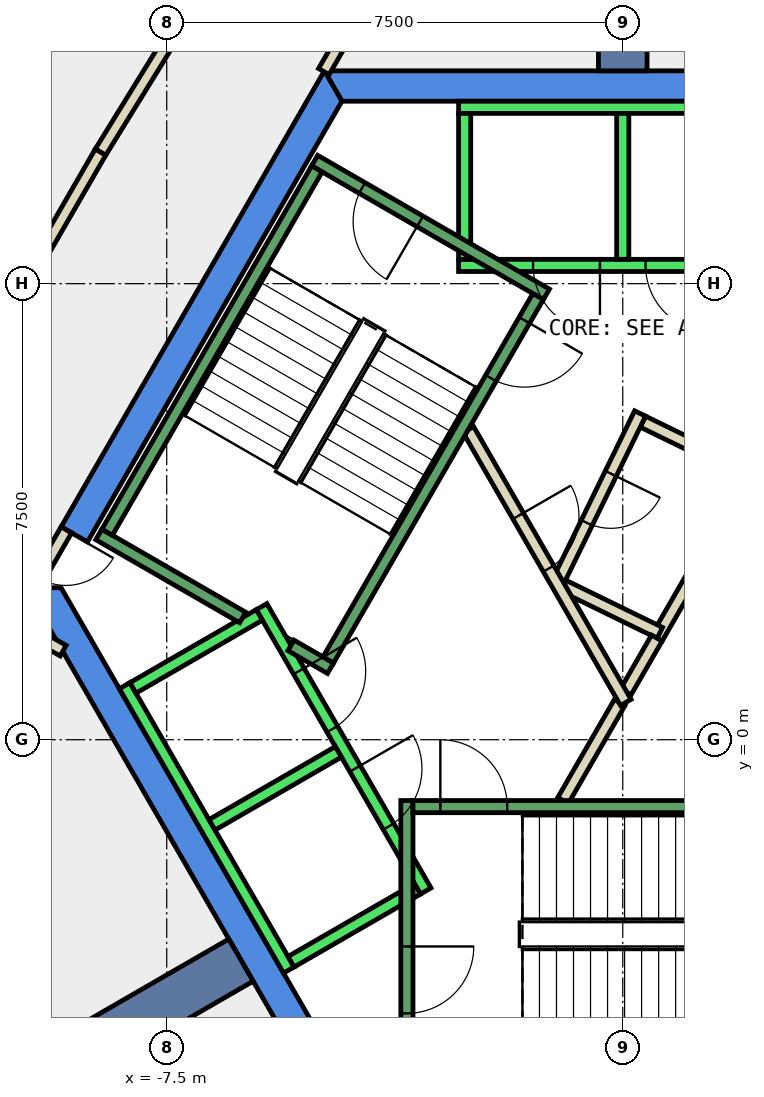
"""IFC4 building model, lengths in metres.
Left out: names, types, materials, properties, quantities, classifications, styles, units other than length and angle.
Written with IfcOpenShell. Run it as: python <this file> out.ifc"""

import sys

from ifc_helpers import new_model, si_unit, direction, frame, frame_2d, origin, place, context, subcontext, project, spatial, polyline, rectangle, outline, extrude, element, fill, save


model = new_model("IFC4")
c1 = context("Model", 3, precision=1e-05, world=origin(), true_north=direction((0.0, 1.0)))
c2 = subcontext(c1, "Body", "Model", "MODEL_VIEW")
j1 = project(units=[si_unit("LENGTHUNIT", "METRE"), si_unit("PLANEANGLEUNIT", "RADIAN")], contexts=[c1])
p1 = place(None, origin())
s1 = spatial("IfcSite", under=j1, at=p1, CompositionType="ELEMENT")
p2 = place(p1, origin())
s2 = spatial("IfcBuilding", under=s1, at=p2, CompositionType="ELEMENT")
p3 = place(p2, frame((0.0, 0.0, 311.6)))
s3 = spatial("IfcBuildingStorey", under=s2, at=p3, CompositionType="ELEMENT", Elevation=311.6)
p4 = place(p3, frame((0.0, 0.0, -0.34)))
e1 = element("IfcWall", 1, at=p4, inside=s3, PredefinedType="SHEAR", context=c2, shape_type="SweptSolid", body=[
    extrude(outline(polyline([(4.907, 11.0), (-4.907, 11.0), (-4.619, 10.5), (4.619, 10.5), (4.907, 11.0)])), origin(), (0.0, 0.0, 1.0), 3.6),
])
p5 = place(p3, frame((0.0, 0.0, -0.34)))
e2 = element("IfcWall", 2, at=p5, inside=s3, PredefinedType="SHEAR", context=c2, shape_type="SweptSolid", body=[
    extrude(outline(polyline([(-9.236, 3.502), (-8.803, 3.253), (-4.619, 10.5), (-4.907, 11.0), (-9.236, 3.502)])), origin(), (0.0, 0.0, 1.0), 3.6),
])
p6 = place(p3, frame((0.0, 0.0, -0.34)))
e3 = element("IfcWall", 3, at=p6, inside=s3, PredefinedType="SHEAR", context=c2, shape_type="SweptSolid", body=[
    extrude(outline(polyline([(-9.815, 2.5), (-4.907, -6.0), (-4.619, -5.5), (-9.238, 2.5), (-9.815, 2.5)])), origin(), (0.0, 0.0, 1.0), 3.6),
])
p7 = place(p3, frame((0.0, 11.0, -0.34), z_axis=(0.0, 0.0, 1.0), x_axis=(0.0, 1.0, 0.0)))
e4 = element("IfcWall", 4, at=p7, inside=s3, PredefinedType="SHEAR", context=c2, shape_type="SweptSolid", body=[
    extrude(rectangle(XDim=9.0, YDim=0.8, at=frame_2d((4.5, 0.0))), origin(), (0.0, 0.0, 1.0), 3.6),
])
p8 = place(p3, frame((-6.279, -3.625, -0.34), z_axis=(0.0, 0.0, 1.0), x_axis=(-0.866017533419, -0.500013631625, 0.0)))
e5 = element("IfcWall", 5, at=p8, inside=s3, PredefinedType="SHEAR", context=c2, shape_type="SweptSolid", body=[
    extrude(rectangle(XDim=9.0, YDim=0.8, at=frame_2d((4.5, 0.0))), origin(), (0.0, 0.0, 1.0), 3.6),
])
p9 = place(p3, frame((0.56, 1.671, 0.0), z_axis=(0.0, 0.0, 1.0), x_axis=(0.500008334558, 0.866020591771, 0.0)))
e6 = element("IfcWall", 6, at=p9, inside=s3, PredefinedType="PARTITIONING", context=c2, shape_type="SweptSolid", body=[
    extrude(rectangle(XDim=2.538, YDim=0.2, at=frame_2d((1.269, 0.0))), origin(), (0.0, 0.0, 1.0), 3.26),
])
p10 = place(p3, frame((2.128, 4.355, 0.0), z_axis=(0.0, 0.0, 1.0), x_axis=(-0.898876404494, 0.438202247191, 0.0)))
e7 = element("IfcWall", 7, at=p10, inside=s3, PredefinedType="PARTITIONING", context=c2, shape_type="SweptSolid", body=[
    extrude(rectangle(XDim=1.999, YDim=0.2, at=frame_2d((1.0, 0.0))), origin(), (0.0, 0.0, 1.0), 3.26),
])
p11 = place(p3, frame((0.285, 5.365, 0.0), z_axis=(0.0, 0.0, 1.0), x_axis=(-0.43840190643, -0.898779043168, 0.0)))
e8 = element("IfcWall", 8, at=p11, inside=s3, PredefinedType="PARTITIONING", context=c2, shape_type="SweptSolid", body=[
    extrude(rectangle(XDim=3.1, YDim=0.2, at=frame_2d((1.55, 0.0))), origin(), (0.0, 0.0, 1.0), 3.26),
])
p12 = place(p11, frame((1.1, 0.0, 0.0)))
e9 = element("IfcOpeningElement", 9, at=p12, cuts=e8, PredefinedType="OPENING", context=c2, shape_type="SweptSolid", body=[
    extrude(rectangle(XDim=0.9, YDim=2.1, at=frame_2d((0.45, 1.05))), frame((0.0, 0.11, 0.0), z_axis=(0.0, -1.0, 0.0), x_axis=(1.0, 0.0, 0.0)), (0.0, 0.0, 1.0), 0.22),
])
p13 = place(p3, frame((-0.984, 2.535, 0.0), z_axis=(0.0, 0.0, 1.0), x_axis=(0.898707583217, -0.438548378025, 0.0)))
e10 = element("IfcWall", 10, at=p13, inside=s3, PredefinedType="PARTITIONING", context=c2, shape_type="SweptSolid", body=[
    extrude(rectangle(XDim=1.774, YDim=0.2, at=frame_2d((0.887, 0.0))), origin(), (0.0, 0.0, 1.0), 3.26),
])
p14 = place(p3, frame((-4.513, 11.687, 0.0), z_axis=(0.0, 0.0, 1.0), x_axis=(-0.499556546863, -0.866281280235, 0.0)))
e11 = element("IfcWall", 11, at=p14, inside=s3, PredefinedType="PARTITIONING", context=c2, shape_type="SweptSolid", body=[
    extrude(rectangle(XDim=0.807, YDim=0.2, at=frame_2d((0.403, 0.0))), origin(), (0.0, 0.0, 1.0), 3.26),
])
p15 = place(p3, frame((-9.203, 1.465, 0.0), z_axis=(0.0, 0.0, 1.0), x_axis=(-0.872341127106, 0.488897696823, 0.0)))
e12 = element("IfcWall", 12, at=p15, inside=s3, PredefinedType="PARTITIONING", context=c2, shape_type="SweptSolid", body=[
    extrude(rectangle(XDim=1.667, YDim=0.2, at=frame_2d((0.833, 0.0))), origin(), (0.0, 0.0, 1.0), 3.26),
])
p16 = place(p3, frame((-12.701, 2.54, 0.0), z_axis=(0.0, 0.0, 1.0), x_axis=(0.499946799636, 0.86605611685, 0.0)))
e13 = element("IfcWall", 13, at=p16, inside=s3, PredefinedType="PARTITIONING", context=c2, shape_type="SweptSolid", body=[
    extrude(rectangle(XDim=8.227, YDim=0.2, at=frame_2d((4.114, 0.0))), origin(), (0.0, 0.0, 1.0), 3.26),
])
p17 = place(p16, frame((3.613, 0.0, 0.0)))
e14 = element("IfcOpeningElement", 14, at=p17, cuts=e13, PredefinedType="OPENING", context=c2, shape_type="SweptSolid", body=[
    extrude(rectangle(XDim=1.0, YDim=2.1, at=frame_2d((0.5, 1.05))), frame((0.0, 0.11, 0.0), z_axis=(0.0, -1.0, 0.0), x_axis=(1.0, 0.0, 0.0)), (0.0, 0.0, 1.0), 0.22),
])
p18 = place(p3, frame((-8.588, 9.665, 0.0), z_axis=(0.0, 0.0, 1.0), x_axis=(0.525142215688, 0.851014484778, 0.0)))
e15 = element("IfcWall", 15, at=p18, inside=s3, PredefinedType="PARTITIONING", context=c2, shape_type="SweptSolid", body=[
    extrude(rectangle(XDim=7.872, YDim=0.2, at=frame_2d((3.936, 0.0))), origin(), (0.0, 0.0, 1.0), 3.26),
])
p19 = place(p3, frame((-0.982, -1.0, 0.0), z_axis=(0.0, 0.0, 1.0), x_axis=(0.50024047865, 0.865886518847, 0.0)))
e16 = element("IfcWall", 16, at=p19, inside=s3, PredefinedType="PARTITIONING", context=c2, shape_type="SweptSolid", body=[
    extrude(rectangle(XDim=1.863, YDim=0.2, at=frame_2d((0.931, 0.0))), origin(), (0.0, 0.0, 1.0), 3.26),
])
p20 = place(p3, frame((0.05, 0.787, 0.0), z_axis=(0.0, 0.0, 1.0), x_axis=(0.499819111317, 0.866129814729, 0.0)))
e17 = element("IfcWall", 17, at=p20, inside=s3, PredefinedType="PARTITIONING", context=c2, shape_type="SweptSolid", body=[
    extrude(rectangle(XDim=1.021, YDim=0.2, at=frame_2d((0.51, 0.0))), origin(), (0.0, 0.0, 1.0), 3.26),
])
p21 = place(p3, frame((-2.54, 5.1, 0.0), z_axis=(0.0, 0.0, 1.0), x_axis=(0.499925051871, -0.866068670783, 0.0)))
e18 = element("IfcWall", 18, at=p21, inside=s3, PredefinedType="PARTITIONING", context=c2, shape_type="SweptSolid", body=[
    extrude(rectangle(XDim=5.181, YDim=0.2, at=frame_2d((2.59, 0.0))), origin(), (0.0, 0.0, 1.0), 3.26),
])
p22 = place(p21, frame((1.64, 0.0, 0.0)))
e19 = element("IfcOpeningElement", 19, at=p22, cuts=e18, PredefinedType="OPENING", context=c2, shape_type="SweptSolid", body=[
    extrude(rectangle(XDim=1.0, YDim=2.1, at=frame_2d((0.5, 1.05))), frame((0.0, 0.11, 0.0), z_axis=(0.0, -1.0, 0.0), x_axis=(1.0, 0.0, 0.0)), (0.0, 0.0, 1.0), 0.22),
])
p23 = place(p3, frame((-9.15, 3.452, 0.0), z_axis=(0.0, 0.0, 1.0), x_axis=(-0.500079945886, -0.865979242085, 0.0)))
e20 = element("IfcWall", 20, at=p23, inside=s3, PredefinedType="PARTITIONING", context=c2, shape_type="SweptSolid", body=[
    extrude(rectangle(XDim=0.926, YDim=0.2, at=frame_2d((0.463, 0.0))), origin(), (0.0, 0.0, 1.0), 2.4),
])
p24 = place(p23, frame((0.017, 0.0, 0.0)))
e21 = element("IfcOpeningElement", 21, at=p24, cuts=e20, PredefinedType="OPENING", context=c2, shape_type="SweptSolid", body=[
    extrude(rectangle(XDim=0.9, YDim=2.1, at=frame_2d((0.45, 1.05))), frame((0.0, 0.11, 0.0), z_axis=(0.0, -1.0, 0.0), x_axis=(1.0, 0.0, 0.0)), (0.0, 0.0, 1.0), 0.22),
])
p25 = place(p3, frame((2.7, 7.8, 0.0), z_axis=(0.0, 0.0, 1.0), x_axis=(-1.0, 0.0, 0.0)))
e22 = element("IfcWall", 22, at=p25, inside=s3, PredefinedType="STANDARD", context=c2, shape_type="SweptSolid", body=[
    extrude(rectangle(XDim=5.4, YDim=0.2, at=frame_2d((2.7, 0.0))), origin(), (0.0, 0.0, 1.0), 3.26),
])
p26 = place(p25, frame((1.225, 0.0, 0.0)))
e23 = element("IfcOpeningElement", 23, at=p26, cuts=e22, PredefinedType="OPENING", context=c2, shape_type="SweptSolid", body=[
    extrude(rectangle(XDim=1.1, YDim=2.1, at=frame_2d((0.55, 1.05))), frame((0.0, 0.11, 0.0), z_axis=(0.0, -1.0, 0.0), x_axis=(1.0, 0.0, 0.0)), (0.0, 0.0, 1.0), 0.22),
])
p27 = place(p25, frame((3.075, 0.0, 0.0)))
e24 = element("IfcOpeningElement", 24, at=p27, cuts=e22, PredefinedType="OPENING", context=c2, shape_type="SweptSolid", body=[
    extrude(rectangle(XDim=1.1, YDim=2.1, at=frame_2d((0.55, 1.05))), frame((0.0, 0.11, 0.0), z_axis=(0.0, -1.0, 0.0), x_axis=(1.0, 0.0, 0.0)), (0.0, 0.0, 1.0), 0.22),
])
p28 = place(p3, frame((2.7, 10.4, 0.0), z_axis=(0.0, 0.0, 1.0), x_axis=(-1.0, 0.0, 0.0)))
e25 = element("IfcWall", 25, at=p28, inside=s3, PredefinedType="STANDARD", context=c2, shape_type="SweptSolid", body=[
    extrude(rectangle(XDim=5.4, YDim=0.2, at=frame_2d((2.7, 0.0))), origin(), (0.0, 0.0, 1.0), 3.26),
])
for number, where, z_axis, x_axis in (
    (26, (0.0, 7.9, 0.0), (0.0, 0.0, 1.0), (0.0, 1.0, 0.0)),
    (27, (-2.6, 7.9, 0.0), (0.0, 0.0, 1.0), (0.0, 1.0, 0.0)),
):
    element("IfcWall", number, at=place(p3, frame(where, z_axis=z_axis, x_axis=x_axis)), inside=s3, PredefinedType="STANDARD", context=c2, shape_type="SweptSolid", body=[
        extrude(rectangle(XDim=2.4, YDim=0.2, at=frame_2d((1.2, 0.0))), origin(), (0.0, 0.0, 1.0), 3.26),
    ])
p29 = place(p3, frame((-5.94, 2.188, 0.0), z_axis=(0.0, 0.0, 1.0), x_axis=(0.500034260056, -0.866005622828, 0.0)))
e28 = element("IfcWall", 28, at=p29, inside=s3, PredefinedType="STANDARD", context=c2, shape_type="SweptSolid", body=[
    extrude(rectangle(XDim=5.399, YDim=0.2, at=frame_2d((2.7, 0.0))), origin(), (0.0, 0.0, 1.0), 3.26),
])
p30 = place(p29, frame((3.075, 0.0, 0.0)))
e29 = element("IfcOpeningElement", 29, at=p30, cuts=e28, PredefinedType="OPENING", context=c2, shape_type="SweptSolid", body=[
    extrude(rectangle(XDim=1.1, YDim=2.1, at=frame_2d((0.55, 1.05))), frame((0.0, 0.11, 0.0), z_axis=(0.0, -1.0, 0.0), x_axis=(1.0, 0.0, 0.0)), (0.0, 0.0, 1.0), 0.22),
])
p31 = place(p29, frame((1.225, 0.0, 0.0)))
e30 = element("IfcOpeningElement", 30, at=p31, cuts=e28, PredefinedType="OPENING", context=c2, shape_type="SweptSolid", body=[
    extrude(rectangle(XDim=1.1, YDim=2.1, at=frame_2d((0.55, 1.05))), frame((0.0, 0.11, 0.0), z_axis=(0.0, -1.0, 0.0), x_axis=(1.0, 0.0, 0.0)), (0.0, 0.0, 1.0), 0.22),
])
p32 = place(p3, frame((-8.192, 0.888, 0.0), z_axis=(0.0, 0.0, 1.0), x_axis=(0.500034260056, -0.866005622828, 0.0)))
e31 = element("IfcWall", 31, at=p32, inside=s3, PredefinedType="STANDARD", context=c2, shape_type="SweptSolid", body=[
    extrude(rectangle(XDim=5.399, YDim=0.2, at=frame_2d((2.7, 0.0))), origin(), (0.0, 0.0, 1.0), 3.26),
])
for number, where, z_axis, x_axis in (
    (32, (-5.977, 2.052, 0.0), (0.0, 0.0, 1.0), (-0.866, -0.5, 0.0)),
    (33, (-4.677, -0.2, 0.0), (0.0, 0.0, 1.0), (-0.866, -0.5, 0.0)),
):
    element("IfcWall", number, at=place(p3, frame(where, z_axis=z_axis, x_axis=x_axis)), inside=s3, PredefinedType="STANDARD", context=c2, shape_type="SweptSolid", body=[
        extrude(rectangle(XDim=2.399, YDim=0.2, at=frame_2d((1.2, 0.0))), origin(), (0.0, 0.0, 1.0), 3.26),
    ])
p33 = place(p3, frame((-3.377, -2.452, 0.0), z_axis=(0.0, 0.0, 1.0), x_axis=(-0.865955154139, -0.50012165622, 0.0)))
e34 = element("IfcWall", 34, at=p33, inside=s3, PredefinedType="STANDARD", context=c2, shape_type="SweptSolid", body=[
    extrude(rectangle(XDim=2.4, YDim=0.2, at=frame_2d((1.2, 0.0))), origin(), (0.0, 0.0, 1.0), 3.26),
])
p34 = place(p3, frame((-3.55, -1.0, 0.0), z_axis=(0.0, 0.0, 1.0), x_axis=(0.0, -1.0, 0.0)))
e35 = element("IfcWall", 35, at=p34, inside=s3, PredefinedType="STANDARD", context=c2, shape_type="SweptSolid", body=[
    extrude(rectangle(XDim=4.4, YDim=0.2, at=frame_2d((2.2, 0.0))), origin(), (0.0, 0.0, 1.0), 3.26),
])
p35 = place(p34, frame((2.4, 0.0, 0.0)))
e36 = element("IfcOpeningElement", 36, at=p35, cuts=e35, PredefinedType="OPENING", context=c2, shape_type="SweptSolid", body=[
    extrude(rectangle(XDim=1.1, YDim=2.2, at=frame_2d((0.55, 1.1))), frame((0.0, 0.11, 0.0), z_axis=(0.0, -1.0, 0.0), x_axis=(1.0, 0.0, 0.0)), (0.0, 0.0, 1.0), 0.22),
])
p36 = place(p3, frame((-3.45, -1.1, 0.0), z_axis=(0.0, 0.0, 1.0), x_axis=(1.0, 0.0, 0.0)))
e37 = element("IfcWall", 37, at=p36, inside=s3, PredefinedType="STANDARD", context=c2, shape_type="SweptSolid", body=[
    extrude(rectangle(XDim=6.9, YDim=0.2, at=frame_2d((3.45, 0.0))), origin(), (0.0, 0.0, 1.0), 3.26),
])
p37 = place(p36, frame((0.45, 0.0, 0.0)))
e38 = element("IfcOpeningElement", 38, at=p37, cuts=e37, PredefinedType="OPENING", context=c2, shape_type="SweptSolid", body=[
    extrude(rectangle(XDim=1.1, YDim=2.2, at=frame_2d((0.55, 1.1))), frame((0.0, 0.11, 0.0), z_axis=(0.0, -1.0, 0.0), x_axis=(1.0, 0.0, 0.0)), (0.0, 0.0, 1.0), 0.22),
])
p38 = place(p3, frame((-1.256, 7.324, 0.0), z_axis=(0.0, 0.0, 1.0), x_axis=(-0.866046073146, 0.499964197906, 0.0)))
e39 = element("IfcWall", 39, at=p38, inside=s3, PredefinedType="STANDARD", context=c2, shape_type="SweptSolid", body=[
    extrude(rectangle(XDim=4.4, YDim=0.2, at=frame_2d((2.2, 0.0))), origin(), (0.0, 0.0, 1.0), 3.26),
])
p39 = place(p38, frame((2.4, 0.0, 0.0)))
e40 = element("IfcOpeningElement", 40, at=p39, cuts=e39, PredefinedType="OPENING", context=c2, shape_type="SweptSolid", body=[
    extrude(rectangle(XDim=1.1, YDim=2.2, at=frame_2d((0.55, 1.1))), frame((0.0, 0.11, 0.0), z_axis=(0.0, -1.0, 0.0), x_axis=(1.0, 0.0, 0.0)), (0.0, 0.0, 1.0), 0.22),
])
p40 = place(p3, frame((-6.25, 2.01, 0.0), z_axis=(0.0, 0.0, 1.0), x_axis=(-0.86611865017, 0.499838457731, 0.0)))
e41 = element("IfcWall", 41, at=p40, inside=s3, PredefinedType="STANDARD", context=c2, shape_type="SweptSolid", body=[
    extrude(rectangle(XDim=2.733, YDim=0.2, at=frame_2d((1.366, 0.0))), origin(), (0.0, 0.0, 1.0), 3.26),
])
p41 = place(p3, frame((-4.806, 1.176, 0.0), z_axis=(0.0, 0.0, 1.0), x_axis=(-0.866558586415, 0.499075361355, 0.0)))
e42 = element("IfcWall", 42, at=p41, inside=s3, PredefinedType="STANDARD", context=c2, shape_type="SweptSolid", body=[
    extrude(rectangle(XDim=0.751, YDim=0.2, at=frame_2d((0.376, 0.0))), origin(), (0.0, 0.0, 1.0), 3.26),
])
p42 = place(p3, frame((-1.393, 7.288, 0.0), z_axis=(0.0, 0.0, 1.0), x_axis=(-0.499963383562, -0.866046543262, 0.0)))
e43 = element("IfcWall", 43, at=p42, inside=s3, PredefinedType="STANDARD", context=c2, shape_type="SweptSolid", body=[
    extrude(rectangle(XDim=6.9, YDim=0.2, at=frame_2d((3.45, 0.0))), origin(), (0.0, 0.0, 1.0), 3.26),
])
p43 = place(p42, frame((0.45, 0.0, 0.0)))
e44 = element("IfcOpeningElement", 44, at=p43, cuts=e43, PredefinedType="OPENING", context=c2, shape_type="SweptSolid", body=[
    extrude(rectangle(XDim=1.1, YDim=2.2, at=frame_2d((0.55, 1.1))), frame((0.0, 0.11, 0.0), z_axis=(0.0, -1.0, 0.0), x_axis=(1.0, 0.0, 0.0)), (0.0, 0.0, 1.0), 0.22),
])
p44 = place(p3, frame((-5.03, 9.388, 0.0), z_axis=(0.0, 0.0, 1.0), x_axis=(-0.499978703459, -0.866037698999, 0.0)))
e45 = element("IfcWall", 45, at=p44, inside=s3, PredefinedType="STANDARD", context=c2, shape_type="SweptSolid", body=[
    extrude(rectangle(XDim=6.9, YDim=0.2, at=frame_2d((3.45, 0.0))), origin(), (0.0, 0.0, 1.0), 3.26),
])
p45 = place(p22, origin())
e46 = element("IfcDoor", 46, at=p45, inside=s3, OperationType="SINGLE_SWING_RIGHT", PredefinedType="DOOR", context=c2, shape_type="SweptSolid", body=[
    extrude(rectangle(XDim=1.0, YDim=2.1, at=frame_2d((0.5, 1.05))), frame((0.0, 0.025, 0.0), z_axis=(0.0, -1.0, 0.0), x_axis=(1.0, 0.0, 0.0)), (0.0, 0.0, 1.0), 0.05),
])
fill(e19, e46)
p46 = place(p12, origin())
e47 = element("IfcDoor", 47, at=p46, inside=s3, OperationType="SINGLE_SWING_RIGHT", PredefinedType="DOOR", context=c2, shape_type="SweptSolid", body=[
    extrude(rectangle(XDim=0.9, YDim=2.1, at=frame_2d((0.45, 1.05))), frame((0.0, 0.025, 0.0), z_axis=(0.0, -1.0, 0.0), x_axis=(1.0, 0.0, 0.0)), (0.0, 0.0, 1.0), 0.05),
])
fill(e9, e47)
p47 = place(p24, origin())
e48 = element("IfcDoor", 48, at=p47, inside=s3, OperationType="SINGLE_SWING_LEFT", PredefinedType="DOOR", context=c2, shape_type="SweptSolid", body=[
    extrude(rectangle(XDim=0.9, YDim=2.1, at=frame_2d((0.45, 1.05))), frame((0.0, 0.025, 0.0), z_axis=(0.0, -1.0, 0.0), x_axis=(1.0, 0.0, 0.0)), (0.0, 0.0, 1.0), 0.05),
])
fill(e21, e48)
p48 = place(p26, origin())
e49 = element("IfcDoor", 49, at=p48, inside=s3, OperationType="SLIDING_TO_LEFT", PredefinedType="DOOR", context=c2, shape_type="SweptSolid", body=[
    extrude(rectangle(XDim=1.1, YDim=2.1, at=frame_2d((0.55, 1.05))), frame((0.0, 0.025, 0.0), z_axis=(0.0, -1.0, 0.0), x_axis=(1.0, 0.0, 0.0)), (0.0, 0.0, 1.0), 0.05),
])
fill(e23, e49)
p49 = place(p27, origin())
e50 = element("IfcDoor", 50, at=p49, inside=s3, OperationType="SLIDING_TO_LEFT", PredefinedType="DOOR", context=c2, shape_type="SweptSolid", body=[
    extrude(rectangle(XDim=1.1, YDim=2.1, at=frame_2d((0.55, 1.05))), frame((0.0, 0.025, 0.0), z_axis=(0.0, -1.0, 0.0), x_axis=(1.0, 0.0, 0.0)), (0.0, 0.0, 1.0), 0.05),
])
fill(e24, e50)
p50 = place(p30, origin())
e51 = element("IfcDoor", 51, at=p50, inside=s3, OperationType="SLIDING_TO_LEFT", PredefinedType="DOOR", context=c2, shape_type="SweptSolid", body=[
    extrude(rectangle(XDim=1.1, YDim=2.1, at=frame_2d((0.55, 1.05))), frame((0.0, 0.025, 0.0), z_axis=(0.0, -1.0, 0.0), x_axis=(1.0, 0.0, 0.0)), (0.0, 0.0, 1.0), 0.05),
])
fill(e29, e51)
p51 = place(p31, origin())
e52 = element("IfcDoor", 52, at=p51, inside=s3, OperationType="SLIDING_TO_LEFT", PredefinedType="DOOR", context=c2, shape_type="SweptSolid", body=[
    extrude(rectangle(XDim=1.1, YDim=2.1, at=frame_2d((0.55, 1.05))), frame((0.0, 0.025, 0.0), z_axis=(0.0, -1.0, 0.0), x_axis=(1.0, 0.0, 0.0)), (0.0, 0.0, 1.0), 0.05),
])
fill(e30, e52)
p52 = place(p37, origin())
e53 = element("IfcDoor", 53, at=p52, inside=s3, OperationType="SINGLE_SWING_LEFT", PredefinedType="DOOR", context=c2, shape_type="SweptSolid", body=[
    extrude(rectangle(XDim=1.1, YDim=2.2, at=frame_2d((0.55, 1.1))), frame((0.0, 0.025, 0.0), z_axis=(0.0, -1.0, 0.0), x_axis=(1.0, 0.0, 0.0)), (0.0, 0.0, 1.0), 0.05),
])
fill(e38, e53)
p53 = place(p35, origin())
e54 = element("IfcDoor", 54, at=p53, inside=s3, OperationType="SINGLE_SWING_LEFT", PredefinedType="DOOR", context=c2, shape_type="SweptSolid", body=[
    extrude(rectangle(XDim=1.1, YDim=2.2, at=frame_2d((0.55, 1.1))), frame((0.0, 0.025, 0.0), z_axis=(0.0, -1.0, 0.0), x_axis=(1.0, 0.0, 0.0)), (0.0, 0.0, 1.0), 0.05),
])
fill(e36, e54)
p54 = place(p43, origin())
e55 = element("IfcDoor", 55, at=p54, inside=s3, OperationType="SINGLE_SWING_LEFT", PredefinedType="DOOR", context=c2, shape_type="SweptSolid", body=[
    extrude(rectangle(XDim=1.1, YDim=2.2, at=frame_2d((0.55, 1.1))), frame((0.0, 0.025, 0.0), z_axis=(0.0, -1.0, 0.0), x_axis=(1.0, 0.0, 0.0)), (0.0, 0.0, 1.0), 0.05),
])
fill(e44, e55)
p55 = place(p39, origin())
e56 = element("IfcDoor", 56, at=p55, inside=s3, OperationType="SINGLE_SWING_LEFT", PredefinedType="DOOR", context=c2, shape_type="SweptSolid", body=[
    extrude(rectangle(XDim=1.1, YDim=2.2, at=frame_2d((0.55, 1.1))), frame((0.0, 0.025, 0.0), z_axis=(0.0, -1.0, 0.0), x_axis=(1.0, 0.0, 0.0)), (0.0, 0.0, 1.0), 0.05),
])
fill(e40, e56)
save(model, sys.argv[1])
